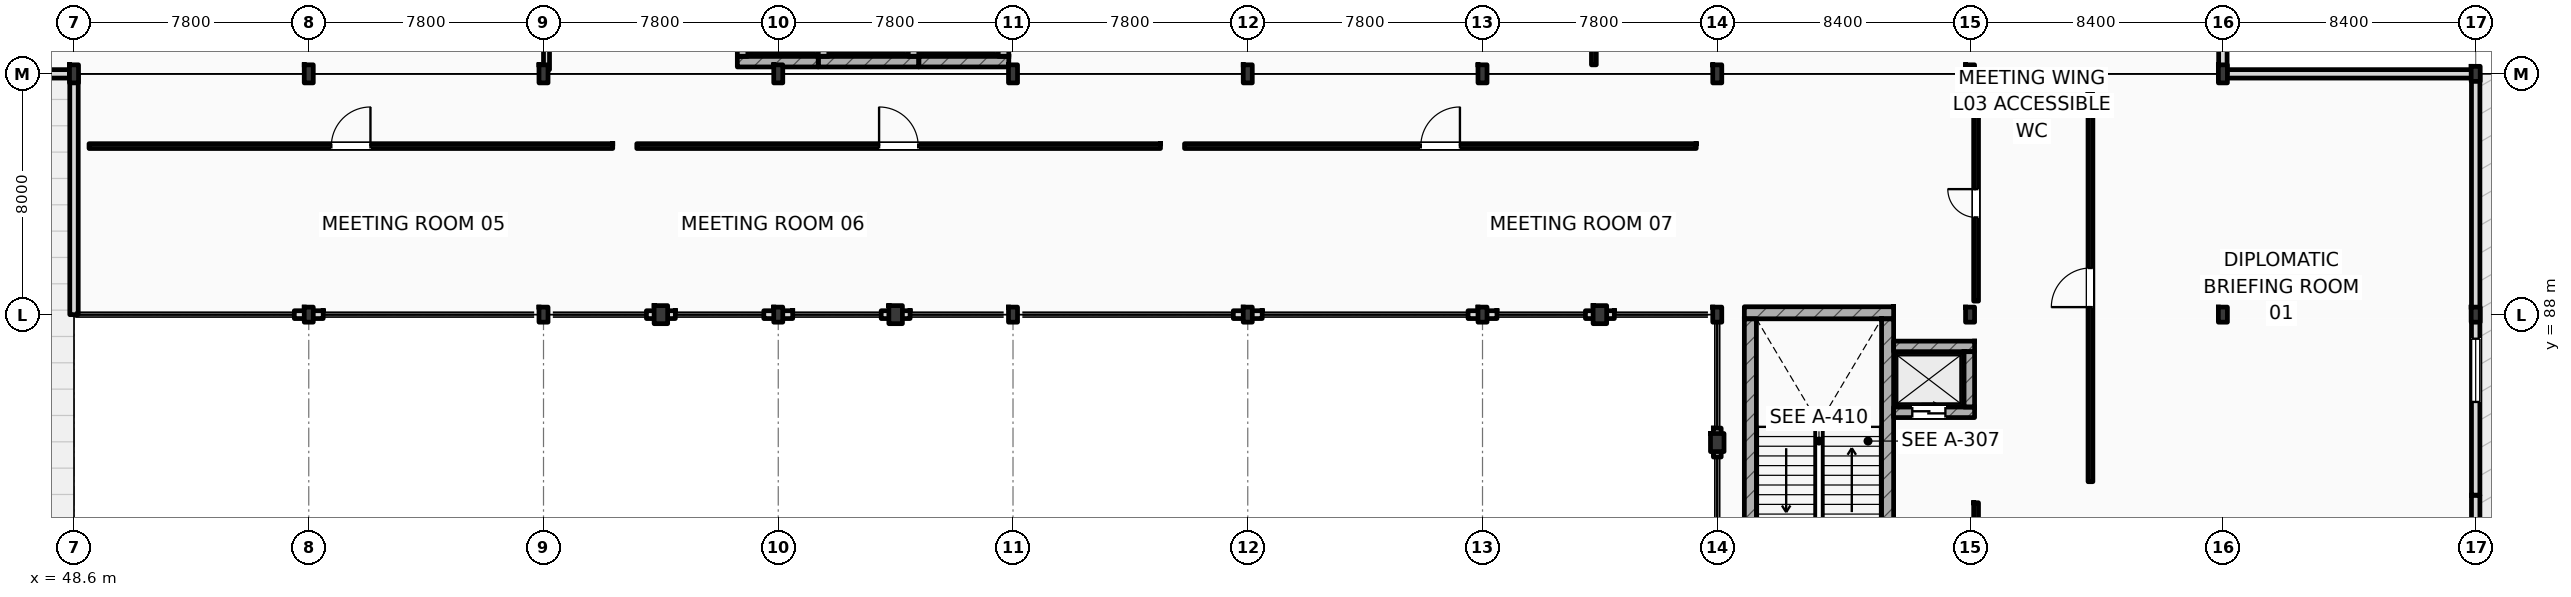
"""IFC4 building model, lengths in metres.
Left out: names, types, materials, properties, quantities, classifications, styles, units other than length and angle.
Written with IfcOpenShell. Run it as: python <this file> out.ifc"""

import sys

from ifc_helpers import new_model, si_unit, direction, frame, frame_2d, origin, origin_2d, place, context, subcontext, project, spatial, rectangle, i_section, extrude, element, fill, save


model = new_model("IFC4")
c1 = context("Model", 3, precision=1e-05, world=origin(), true_north=direction((0.0, 1.0)))
c2 = subcontext(c1, "Body", "Model", "MODEL_VIEW")
j1 = project(units=[si_unit("LENGTHUNIT", "METRE"), si_unit("PLANEANGLEUNIT", "RADIAN")], contexts=[c1])
p1 = place(None, origin())
s1 = spatial("IfcSite", under=j1, at=p1, CompositionType="ELEMENT")
p2 = place(p1, origin())
s2 = spatial("IfcBuilding", under=s1, at=p2, CompositionType="ELEMENT")
p3 = place(p2, frame((0.0, 0.0, 16.2)))
s3 = spatial("IfcBuildingStorey", under=s2, at=p3, CompositionType="ELEMENT", Elevation=16.2)
for number, where, z_axis, x_axis in (
    (1, (48.6, 96.0, 0.0), (0.0, 0.0, 1.0), (1.0, 0.0, 0.0)),
    (2, (56.4, 96.0, 0.0), (0.0, 0.0, 1.0), (1.0, 0.0, 0.0)),
    (3, (64.2, 96.0, 0.0), (0.0, 0.0, 1.0), (1.0, 0.0, 0.0)),
    (4, (72.0, 96.0, 0.0), (0.0, 0.0, 1.0), (1.0, 0.0, 0.0)),
    (5, (79.8, 96.0, 0.0), (0.0, 0.0, 1.0), (1.0, 0.0, 0.0)),
    (6, (87.6, 96.0, 0.0), (0.0, 0.0, 1.0), (1.0, 0.0, 0.0)),
    (7, (95.4, 96.0, 0.0), (0.0, 0.0, 1.0), (1.0, 0.0, 0.0)),
    (8, (103.2, 96.0, 0.0), (0.0, 0.0, 1.0), (1.0, 0.0, 0.0)),
    (9, (111.6, 96.0, 0.0), (0.0, 0.0, 1.0), (1.0, 0.0, 0.0)),
    (10, (120.0, 96.0, 0.0), (0.0, 0.0, 1.0), (1.0, 0.0, 0.0)),
):
    element("IfcColumn", number, at=place(p3, frame(where, z_axis=z_axis, x_axis=x_axis)), inside=s3, PredefinedType="COLUMN", context=c2, shape_type="SweptSolid", body=[
        extrude(i_section(OverallWidth=0.3, OverallDepth=0.6, WebThickness=0.015, FlangeThickness=0.03, FilletRadius=0.027, at=origin_2d()), origin(), (0.0, 0.0, 1.0), 4.2),
    ])
for number, where, z_axis, x_axis in (
    (11, (56.4, 88.0, 0.0), (0.0, 0.0, 1.0), (1.0, 0.0, 0.0)),
    (12, (64.2, 88.0, 0.0), (0.0, 0.0, 1.0), (1.0, 0.0, 0.0)),
    (13, (72.0, 88.0, 0.0), (0.0, 0.0, 1.0), (1.0, 0.0, 0.0)),
    (14, (79.8, 88.0, 0.0), (0.0, 0.0, 1.0), (1.0, 0.0, 0.0)),
    (15, (87.6, 88.0, 0.0), (0.0, 0.0, 1.0), (1.0, 0.0, 0.0)),
    (16, (95.4, 88.0, 0.0), (0.0, 0.0, 1.0), (1.0, 0.0, 0.0)),
    (17, (103.2, 88.0, 0.0), (0.0, 0.0, 1.0), (1.0, 0.0, 0.0)),
    (18, (111.6, 88.0, 0.0), (0.0, 0.0, 1.0), (1.0, 0.0, 0.0)),
    (19, (120.0, 88.0, 0.0), (0.0, 0.0, 1.0), (1.0, 0.0, 0.0)),
    (20, (128.4, 88.0, 0.0), (0.0, 0.0, 1.0), (1.0, 0.0, 0.0)),
    (21, (128.4, 96.0, 0.0), (0.0, 0.0, 1.0), (1.0, 0.0, 0.0)),
):
    element("IfcColumn", number, at=place(p3, frame(where, z_axis=z_axis, x_axis=x_axis)), inside=s3, PredefinedType="COLUMN", context=c2, shape_type="SweptSolid", body=[
        extrude(i_section(OverallWidth=0.3, OverallDepth=0.5, WebThickness=0.014, FlangeThickness=0.028, FilletRadius=0.027, at=origin_2d()), origin(), (0.0, 0.0, 1.0), 4.2),
    ])
for number, where, z_axis, x_axis in (
    (22, (103.2, 83.75, 0.0), (0.0, 0.0, 1.0), (1.0, 0.0, 0.0)),
    (23, (68.1, 88.0, 0.0), (0.0, 0.0, 1.0), (1.0, 0.0, 0.0)),
    (24, (75.9, 88.0, 0.0), (0.0, 0.0, 1.0), (1.0, 0.0, 0.0)),
    (25, (99.3, 88.0, 0.0), (0.0, 0.0, 1.0), (1.0, 0.0, 0.0)),
):
    element("IfcColumn", number, at=place(p3, frame(where, z_axis=z_axis, x_axis=x_axis)), inside=s3, PredefinedType="PILASTER", context=c2, shape_type="SweptSolid", body=[
        extrude(rectangle(XDim=0.45, YDim=0.6, at=origin_2d()), origin(), (0.0, 0.0, 1.0), 4.2),
    ])
p4 = place(p3, frame((104.1, 88.062, 0.0), z_axis=(0.0, 0.0, 1.0), x_axis=(1.0, 0.0, 0.0)))
e26 = element("IfcWall", 26, at=p4, inside=s3, PredefinedType="SHEAR", context=c2, shape_type="SweptSolid", body=[
    extrude(rectangle(XDim=4.96, YDim=0.4, at=frame_2d((2.48, 0.0))), origin(), (0.0, 0.0, 1.0), 4.2),
])
p5 = place(p3, frame((104.3, 78.75, 0.0), z_axis=(0.0, 0.0, 1.0), x_axis=(0.0, 1.0, 0.0)))
e27 = element("IfcWall", 27, at=p5, inside=s3, PredefinedType="SHEAR", context=c2, shape_type="SweptSolid", body=[
    extrude(rectangle(XDim=9.112, YDim=0.4, at=frame_2d((4.556, 0.0))), origin(), (0.0, 0.0, 1.0), 4.2),
])
p6 = place(p3, frame((108.86, 78.75, 0.0), z_axis=(0.0, 0.0, 1.0), x_axis=(0.0, 1.0, 0.0)))
e28 = element("IfcWall", 28, at=p6, inside=s3, PredefinedType="SHEAR", context=c2, shape_type="SweptSolid", body=[
    extrude(rectangle(XDim=9.112, YDim=0.4, at=frame_2d((4.556, 0.0))), origin(), (0.0, 0.0, 1.0), 4.2),
])
p7 = place(p6, frame((0.44, 0.0, 0.0)))
e29 = element("IfcOpeningElement", 29, at=p7, cuts=e28, PredefinedType="OPENING", context=c2, shape_type="SweptSolid", body=[
    extrude(rectangle(XDim=1.1, YDim=2.2, at=frame_2d((0.55, 1.1))), frame((0.0, 0.21, 0.0), z_axis=(0.0, -1.0, 0.0), x_axis=(1.0, 0.0, 0.0)), (0.0, 0.0, 1.0), 0.42),
])
for number, where, z_axis, x_axis in (
    (30, (55.92, 88.0, 0.0), (0.0, 0.0, 1.0), (1.0, 0.0, 0.0)),
    (31, (67.62, 88.0, 0.0), (0.0, 0.0, 1.0), (1.0, 0.0, 0.0)),
    (32, (71.52, 88.0, 0.0), (0.0, 0.0, 1.0), (1.0, 0.0, 0.0)),
    (33, (75.42, 88.0, 0.0), (0.0, 0.0, 1.0), (1.0, 0.0, 0.0)),
    (34, (87.12, 88.0, 0.0), (0.0, 0.0, 1.0), (1.0, 0.0, 0.0)),
    (35, (94.92, 88.0, 0.0), (0.0, 0.0, 1.0), (1.0, 0.0, 0.0)),
    (36, (98.82, 88.0, 0.0), (0.0, 0.0, 1.0), (1.0, 0.0, 0.0)),
):
    element("IfcWall", number, at=place(p3, frame(where, z_axis=z_axis, x_axis=x_axis)), inside=s3, PredefinedType="STANDARD", context=c2, shape_type="SweptSolid", body=[
        extrude(rectangle(XDim=0.96, YDim=0.26, at=frame_2d((0.48, 0.0))), origin(), (0.0, 0.0, 1.0), 3.46),
    ])
p8 = place(p3, frame((48.6, 88.0, 0.0), z_axis=(0.0, 0.0, 1.0), x_axis=(0.0, 1.0, 0.0)))
e37 = element("IfcWall", 37, at=p8, inside=s3, PredefinedType="STANDARD", context=c2, shape_type="SweptSolid", body=[
    extrude(rectangle(XDim=8.0, YDim=0.28, at=frame_2d((4.0, 0.0))), origin(), (0.0, 0.0, 1.0), 3.92),
])
p9 = place(p3, frame((103.2, 83.27, 0.0), z_axis=(0.0, 0.0, 1.0), x_axis=(0.0, 1.0, 0.0)))
e38 = element("IfcWall", 38, at=p9, inside=s3, PredefinedType="STANDARD", context=c2, shape_type="SweptSolid", body=[
    extrude(rectangle(XDim=0.96, YDim=0.26, at=frame_2d((0.48, 0.0))), origin(), (0.0, 0.0, 1.0), 3.51),
])
p10 = place(p3, frame((128.4, 68.0, 0.0), z_axis=(0.0, 0.0, 1.0), x_axis=(0.0, 1.0, 0.0)))
e39 = element("IfcWall", 39, at=p10, inside=s3, PredefinedType="STANDARD", context=c2, shape_type="SweptSolid", body=[
    extrude(rectangle(XDim=14.0, YDim=0.28, at=frame_2d((7.0, 0.0))), origin(), (0.0, 0.0, 1.0), 3.51),
])
p11 = place(p10, frame((4.5, 0.0, 1.0)))
e40 = element("IfcOpeningElement", 40, at=p11, cuts=e39, PredefinedType="OPENING", context=c2, shape_type="SweptSolid", body=[
    extrude(rectangle(XDim=2.1, YDim=2.0, at=frame_2d((1.05, 1.0))), frame((0.0, 0.15, 0.0), z_axis=(0.0, -1.0, 0.0), x_axis=(1.0, 0.0, 0.0)), (0.0, 0.0, 1.0), 0.3),
])
p12 = place(p3, frame((128.4, 82.0, 0.0), z_axis=(0.0, 0.0, 1.0), x_axis=(0.0, 1.0, 0.0)))
e41 = element("IfcWall", 41, at=p12, inside=s3, PredefinedType="STANDARD", context=c2, shape_type="SweptSolid", body=[
    extrude(rectangle(XDim=14.0, YDim=0.28, at=frame_2d((7.0, 0.0))), origin(), (0.0, 0.0, 1.0), 3.51),
])
p13 = place(p12, frame((3.1, 0.0, 1.0)))
e42 = element("IfcOpeningElement", 42, at=p13, cuts=e41, PredefinedType="OPENING", context=c2, shape_type="SweptSolid", body=[
    extrude(rectangle(XDim=2.1, YDim=2.0, at=frame_2d((1.05, 1.0))), frame((0.0, 0.15, 0.0), z_axis=(0.0, -1.0, 0.0), x_axis=(1.0, 0.0, 0.0)), (0.0, 0.0, 1.0), 0.3),
])
p14 = place(p3, frame((120.0, 96.0, 0.0), z_axis=(0.0, 0.0, 1.0), x_axis=(1.0, 0.0, 0.0)))
e43 = element("IfcWall", 43, at=p14, inside=s3, PredefinedType="STANDARD", context=c2, shape_type="SweptSolid", body=[
    extrude(rectangle(XDim=8.4, YDim=0.28, at=frame_2d((4.2, 0.0))), origin(), (0.0, 0.0, 1.0), 3.36),
])
p15 = place(p3, frame((120.0, 96.0, 0.0), z_axis=(0.0, 0.0, 1.0), x_axis=(0.0, 1.0, 0.0)))
e44 = element("IfcWall", 44, at=p15, inside=s3, PredefinedType="STANDARD", context=c2, shape_type="SweptSolid", body=[
    extrude(rectangle(XDim=22.0, YDim=0.28, at=frame_2d((11.0, 0.0))), origin(), (0.0, 0.0, 1.0), 3.51),
])
p16 = place(p3, frame((25.2, 96.0, 0.0), z_axis=(0.0, 0.0, 1.0), x_axis=(1.0, 0.0, 0.0)))
e45 = element("IfcWall", 45, at=p16, inside=s3, PredefinedType="STANDARD", context=c2, shape_type="SweptSolid", body=[
    extrude(rectangle(XDim=23.4, YDim=0.28, at=frame_2d((11.7, 0.0))), origin(), (0.0, 0.0, 1.0), 3.46),
])
p17 = place(p3, frame((70.64, 96.405, 0.0), z_axis=(0.0, 0.0, 1.0), x_axis=(1.0, 0.0, 0.0)))
e46 = element("IfcWall", 46, at=p17, inside=s3, PredefinedType="SHEAR", context=c2, shape_type="SweptSolid", body=[
    extrude(rectangle(XDim=2.69, YDim=0.35, at=frame_2d((1.345, 0.0))), origin(), (0.0, 0.0, 1.0), 3.92),
])
p18 = place(p3, frame((70.815, 96.58, 0.0), z_axis=(0.0, 0.0, 1.0), x_axis=(0.0, 1.0, 0.0)))
e47 = element("IfcWall", 47, at=p18, inside=s3, PredefinedType="SHEAR", context=c2, shape_type="SweptSolid", body=[
    extrude(rectangle(XDim=1.84, YDim=0.35, at=frame_2d((0.92, 0.0))), origin(), (0.0, 0.0, 1.0), 3.92),
])
p19 = place(p3, frame((73.33, 96.405, 0.0), z_axis=(0.0, 0.0, 1.0), x_axis=(1.0, 0.0, 0.0)))
e48 = element("IfcWall", 48, at=p19, inside=s3, PredefinedType="SHEAR", context=c2, shape_type="SweptSolid", body=[
    extrude(rectangle(XDim=3.34, YDim=0.35, at=frame_2d((1.67, 0.0))), origin(), (0.0, 0.0, 1.0), 3.92),
])
for number, where, z_axis, x_axis in (
    (49, (73.505, 96.58, 0.0), (0.0, 0.0, 1.0), (0.0, 1.0, 0.0)),
    (50, (76.495, 96.58, 0.0), (0.0, 0.0, 1.0), (0.0, 1.0, 0.0)),
):
    element("IfcWall", number, at=place(p3, frame(where, z_axis=z_axis, x_axis=x_axis)), inside=s3, PredefinedType="SHEAR", context=c2, shape_type="SweptSolid", body=[
        extrude(rectangle(XDim=1.84, YDim=0.35, at=frame_2d((0.92, 0.0))), origin(), (0.0, 0.0, 1.0), 3.92),
    ])
p20 = place(p3, frame((76.67, 96.405, 0.0), z_axis=(0.0, 0.0, 1.0), x_axis=(1.0, 0.0, 0.0)))
e51 = element("IfcWall", 51, at=p20, inside=s3, PredefinedType="SHEAR", context=c2, shape_type="SweptSolid", body=[
    extrude(rectangle(XDim=2.99, YDim=0.35, at=frame_2d((1.495, 0.0))), origin(), (0.0, 0.0, 1.0), 3.92),
])
p21 = place(p3, frame((79.485, 96.58, 0.0), z_axis=(0.0, 0.0, 1.0), x_axis=(0.0, 1.0, 0.0)))
e52 = element("IfcWall", 52, at=p21, inside=s3, PredefinedType="SHEAR", context=c2, shape_type="SweptSolid", body=[
    extrude(rectangle(XDim=1.84, YDim=0.35, at=frame_2d((0.92, 0.0))), origin(), (0.0, 0.0, 1.0), 3.51),
])
p22 = place(p3, frame((109.06, 86.945, 0.0), z_axis=(0.0, 0.0, 1.0), x_axis=(1.0, 0.0, 0.0)))
e53 = element("IfcWall", 53, at=p22, inside=s3, PredefinedType="SHEAR", context=c2, shape_type="SweptSolid", body=[
    extrude(rectangle(XDim=2.69, YDim=0.35, at=frame_2d((1.345, 0.0))), origin(), (0.0, 0.0, 1.0), 3.92),
])
p23 = place(p3, frame((109.06, 84.755, 0.0), z_axis=(0.0, 0.0, 1.0), x_axis=(1.0, 0.0, 0.0)))
e54 = element("IfcWall", 54, at=p23, inside=s3, PredefinedType="SHEAR", context=c2, shape_type="SweptSolid", body=[
    extrude(rectangle(XDim=2.69, YDim=0.35, at=frame_2d((1.345, 0.0))), origin(), (0.0, 0.0, 1.0), 3.92),
])
p24 = place(p23, frame((0.62, 0.0, 0.0)))
e55 = element("IfcOpeningElement", 55, at=p24, cuts=e54, PredefinedType="OPENING", context=c2, shape_type="SweptSolid", body=[
    extrude(rectangle(XDim=1.1, YDim=2.2, at=frame_2d((0.55, 1.1))), frame((0.0, 0.185, 0.0), z_axis=(0.0, -1.0, 0.0), x_axis=(1.0, 0.0, 0.0)), (0.0, 0.0, 1.0), 0.37),
])
p25 = place(p3, frame((111.575, 84.93, 0.0), z_axis=(0.0, 0.0, 1.0), x_axis=(0.0, 1.0, 0.0)))
e56 = element("IfcWall", 56, at=p25, inside=s3, PredefinedType="SHEAR", context=c2, shape_type="SweptSolid", body=[
    extrude(rectangle(XDim=1.84, YDim=0.35, at=frame_2d((0.92, 0.0))), origin(), (0.0, 0.0, 1.0), 3.51),
])
p26 = place(p3, frame((64.3, 96.14, 0.0), z_axis=(0.0, 0.0, 1.0), x_axis=(0.0, 1.0, 0.0)))
e57 = element("IfcWall", 57, at=p26, inside=s3, PredefinedType="PARTITIONING", context=c2, shape_type="SweptSolid", body=[
    extrude(rectangle(XDim=11.08, YDim=0.2, at=frame_2d((5.54, 0.0))), origin(), (0.0, 0.0, 1.0), 3.51),
])
p27 = place(p3, frame((99.1, 96.3, 0.0), z_axis=(0.0, 0.0, 1.0), x_axis=(0.0, 1.0, 0.0)))
e58 = element("IfcWall", 58, at=p27, inside=s3, PredefinedType="PARTITIONING", context=c2, shape_type="SweptSolid", body=[
    extrude(rectangle(XDim=10.6, YDim=0.16, at=frame_2d((5.3, 0.0))), origin(), (0.0, 0.0, 1.0), 3.92),
])
p28 = place(p3, frame((49.1, 93.6, 0.0), z_axis=(0.0, 0.0, 1.0), x_axis=(1.0, 0.0, 0.0)))
e59 = element("IfcWall", 59, at=p28, inside=s3, PredefinedType="PARTITIONING", context=c2, shape_type="SweptSolid", body=[
    extrude(rectangle(XDim=17.4, YDim=0.16, at=frame_2d((8.7, 0.0))), origin(), (0.0, 0.0, 1.0), 3.92),
])
p29 = place(p28, frame((8.05, 0.0, 0.0)))
e60 = element("IfcOpeningElement", 60, at=p29, cuts=e59, PredefinedType="OPENING", context=c2, shape_type="SweptSolid", body=[
    extrude(rectangle(XDim=1.3, YDim=2.2, at=frame_2d((0.65, 1.1))), frame((0.0, 0.09, 0.0), z_axis=(0.0, -1.0, 0.0), x_axis=(1.0, 0.0, 0.0)), (0.0, 0.0, 1.0), 0.18),
])
p30 = place(p3, frame((67.3, 93.6, 0.0), z_axis=(0.0, 0.0, 1.0), x_axis=(1.0, 0.0, 0.0)))
e61 = element("IfcWall", 61, at=p30, inside=s3, PredefinedType="PARTITIONING", context=c2, shape_type="SweptSolid", body=[
    extrude(rectangle(XDim=17.4, YDim=0.16, at=frame_2d((8.7, 0.0))), origin(), (0.0, 0.0, 1.0), 3.92),
])
p31 = place(p30, frame((8.05, 0.0, 0.0)))
e62 = element("IfcOpeningElement", 62, at=p31, cuts=e61, PredefinedType="OPENING", context=c2, shape_type="SweptSolid", body=[
    extrude(rectangle(XDim=1.3, YDim=2.2, at=frame_2d((0.65, 1.1))), frame((0.0, 0.09, 0.0), z_axis=(0.0, -1.0, 0.0), x_axis=(1.0, 0.0, 0.0)), (0.0, 0.0, 1.0), 0.18),
])
p32 = place(p3, frame((85.5, 93.6, 0.0), z_axis=(0.0, 0.0, 1.0), x_axis=(1.0, 0.0, 0.0)))
e63 = element("IfcWall", 63, at=p32, inside=s3, PredefinedType="PARTITIONING", context=c2, shape_type="SweptSolid", body=[
    extrude(rectangle(XDim=17.0, YDim=0.16, at=frame_2d((8.5, 0.0))), origin(), (0.0, 0.0, 1.0), 3.92),
])
p33 = place(p32, frame((7.85, 0.0, 0.0)))
e64 = element("IfcOpeningElement", 64, at=p33, cuts=e63, PredefinedType="OPENING", context=c2, shape_type="SweptSolid", body=[
    extrude(rectangle(XDim=1.3, YDim=2.2, at=frame_2d((0.65, 1.1))), frame((0.0, 0.09, 0.0), z_axis=(0.0, -1.0, 0.0), x_axis=(1.0, 0.0, 0.0)), (0.0, 0.0, 1.0), 0.18),
])
p34 = place(p3, frame((111.8, 68.45, 0.0), z_axis=(0.0, 0.0, 1.0), x_axis=(0.0, 1.0, 0.0)))
e65 = element("IfcWall", 65, at=p34, inside=s3, PredefinedType="PARTITIONING", context=c2, shape_type="SweptSolid", body=[
    extrude(rectangle(XDim=13.3, YDim=0.16, at=frame_2d((6.65, 0.0))), origin(), (0.0, 0.0, 1.0), 3.51),
])
p35 = place(p34, frame((6.0, 0.0, 0.0)))
e66 = element("IfcOpeningElement", 66, at=p35, cuts=e65, PredefinedType="OPENING", context=c2, shape_type="SweptSolid", body=[
    extrude(rectangle(XDim=1.3, YDim=2.2, at=frame_2d((0.65, 1.1))), frame((0.0, 0.09, 0.0), z_axis=(0.0, -1.0, 0.0), x_axis=(1.0, 0.0, 0.0)), (0.0, 0.0, 1.0), 0.18),
])
p36 = place(p3, frame((115.6, 82.45, 0.0), z_axis=(0.0, 0.0, 1.0), x_axis=(0.0, 1.0, 0.0)))
e67 = element("IfcWall", 67, at=p36, inside=s3, PredefinedType="PARTITIONING", context=c2, shape_type="SweptSolid", body=[
    extrude(rectangle(XDim=12.9, YDim=0.16, at=frame_2d((6.45, 0.0))), origin(), (0.0, 0.0, 1.0), 3.92),
])
p37 = place(p36, frame((5.8, 0.0, 0.0)))
e68 = element("IfcOpeningElement", 68, at=p37, cuts=e67, PredefinedType="OPENING", context=c2, shape_type="SweptSolid", body=[
    extrude(rectangle(XDim=1.3, YDim=2.2, at=frame_2d((0.65, 1.1))), frame((0.0, 0.09, 0.0), z_axis=(0.0, -1.0, 0.0), x_axis=(1.0, 0.0, 0.0)), (0.0, 0.0, 1.0), 0.18),
])
p38 = place(p3, frame((111.8, 88.45, 0.0), z_axis=(0.0, 0.0, 1.0), x_axis=(0.0, 1.0, 0.0)))
e69 = element("IfcWall", 69, at=p38, inside=s3, PredefinedType="PARTITIONING", context=c2, shape_type="SweptSolid", body=[
    extrude(rectangle(XDim=6.5, YDim=0.16, at=frame_2d((3.25, 0.0))), origin(), (0.0, 0.0, 1.0), 3.51),
])
p39 = place(p38, frame((2.78, 0.0, 0.0)))
e70 = element("IfcOpeningElement", 70, at=p39, cuts=e69, PredefinedType="OPENING", context=c2, shape_type="SweptSolid", body=[
    extrude(rectangle(XDim=0.94, YDim=2.15, at=frame_2d((0.47, 1.075))), frame((0.0, 0.09, 0.0), z_axis=(0.0, -1.0, 0.0), x_axis=(1.0, 0.0, 0.0)), (0.0, 0.0, 1.0), 0.18),
])
p40 = place(p13, origin())
e71 = element("IfcWindow", 71, at=p40, inside=s3, PartitioningType="DOUBLE_PANEL_VERTICAL", PredefinedType="WINDOW", context=c2, shape_type="SweptSolid", body=[
    extrude(rectangle(XDim=2.1, YDim=2.0, at=frame_2d((1.05, 1.0))), frame((0.0, 0.03, 0.0), z_axis=(0.0, -1.0, 0.0), x_axis=(1.0, 0.0, 0.0)), (0.0, 0.0, 1.0), 0.06),
])
fill(e42, e71)
p41 = place(p24, origin())
e72 = element("IfcDoor", 72, at=p41, inside=s3, OperationType="SLIDING_TO_LEFT", PredefinedType="DOOR", context=c2, shape_type="SweptSolid", body=[
    extrude(rectangle(XDim=1.1, YDim=2.2, at=frame_2d((0.55, 1.1))), frame((0.0, 0.025, 0.0), z_axis=(0.0, -1.0, 0.0), x_axis=(1.0, 0.0, 0.0)), (0.0, 0.0, 1.0), 0.05),
])
fill(e55, e72)
p42 = place(p29, origin())
e73 = element("IfcDoor", 73, at=p42, inside=s3, OperationType="SINGLE_SWING_RIGHT", PredefinedType="DOOR", context=c2, shape_type="SweptSolid", body=[
    extrude(rectangle(XDim=1.3, YDim=2.2, at=frame_2d((0.65, 1.1))), frame((0.0, 0.025, 0.0), z_axis=(0.0, -1.0, 0.0), x_axis=(1.0, 0.0, 0.0)), (0.0, 0.0, 1.0), 0.05),
])
fill(e60, e73)
p43 = place(p31, origin())
e74 = element("IfcDoor", 74, at=p43, inside=s3, OperationType="SINGLE_SWING_LEFT", PredefinedType="DOOR", context=c2, shape_type="SweptSolid", body=[
    extrude(rectangle(XDim=1.3, YDim=2.2, at=frame_2d((0.65, 1.1))), frame((0.0, 0.025, 0.0), z_axis=(0.0, -1.0, 0.0), x_axis=(1.0, 0.0, 0.0)), (0.0, 0.0, 1.0), 0.05),
])
fill(e62, e74)
p44 = place(p33, origin())
e75 = element("IfcDoor", 75, at=p44, inside=s3, OperationType="SINGLE_SWING_RIGHT", PredefinedType="DOOR", context=c2, shape_type="SweptSolid", body=[
    extrude(rectangle(XDim=1.3, YDim=2.2, at=frame_2d((0.65, 1.1))), frame((0.0, 0.025, 0.0), z_axis=(0.0, -1.0, 0.0), x_axis=(1.0, 0.0, 0.0)), (0.0, 0.0, 1.0), 0.05),
])
fill(e64, e75)
p45 = place(p37, origin())
e76 = element("IfcDoor", 76, at=p45, inside=s3, OperationType="SINGLE_SWING_LEFT", PredefinedType="DOOR", context=c2, shape_type="SweptSolid", body=[
    extrude(rectangle(XDim=1.3, YDim=2.2, at=frame_2d((0.65, 1.1))), frame((0.0, 0.025, 0.0), z_axis=(0.0, -1.0, 0.0), x_axis=(1.0, 0.0, 0.0)), (0.0, 0.0, 1.0), 0.05),
])
fill(e68, e76)
p46 = place(p39, origin())
e77 = element("IfcDoor", 77, at=p46, inside=s3, OperationType="SINGLE_SWING_RIGHT", PredefinedType="DOOR", context=c2, shape_type="SweptSolid", body=[
    extrude(rectangle(XDim=0.94, YDim=2.15, at=frame_2d((0.47, 1.075))), frame((0.0, 0.025, 0.0), z_axis=(0.0, -1.0, 0.0), x_axis=(1.0, 0.0, 0.0)), (0.0, 0.0, 1.0), 0.05),
])
fill(e70, e77)
save(model, sys.argv[1])
